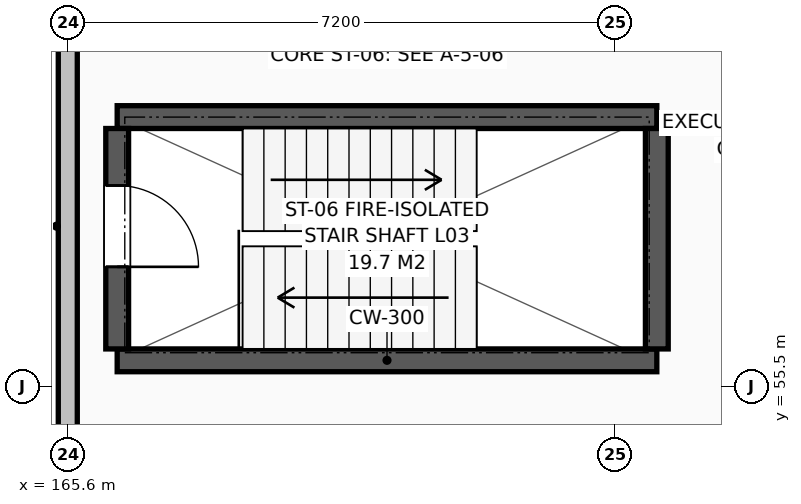
"""IFC4 building model, lengths in metres.
Left out: names, types, materials, properties, quantities, classifications, styles, units other than length and angle.
Written with IfcOpenShell. Run it as: python <this file> out.ifc"""

import sys

from ifc_helpers import new_model, si_unit, direction, frame, frame_2d, origin, place, context, subcontext, project, spatial, rectangle, extrude, element, fill, save


model = new_model("IFC4")
c1 = context("Model", 3, precision=1e-05, world=origin(), true_north=direction((0.0, 1.0)))
c2 = subcontext(c1, "Body", "Model", "MODEL_VIEW")
j1 = project(units=[si_unit("LENGTHUNIT", "METRE"), si_unit("PLANEANGLEUNIT", "RADIAN")], contexts=[c1])
p1 = place(None, origin())
s1 = spatial("IfcSite", under=j1, at=p1, CompositionType="ELEMENT")
p2 = place(p1, origin())
s2 = spatial("IfcBuilding", under=s1, at=p2, CompositionType="ELEMENT")
p3 = place(p2, frame((0.0, 0.0, 13.2)))
s3 = spatial("IfcBuildingStorey", under=s2, at=p3, CompositionType="ELEMENT", Elevation=13.2)
p4 = place(p3, frame((165.6, 64.8, 0.0), z_axis=(0.0, 0.0, 1.0), x_axis=(0.0, -1.0, 0.0)))
e1 = element("IfcWall", 1, at=p4, inside=s3, PredefinedType="SOLIDWALL", context=c2, shape_type="SweptSolid", body=[
    extrude(rectangle(XDim=32.4, YDim=0.25, at=frame_2d((16.2, 0.0))), origin(), (0.0, 0.0, 1.0), 3.35),
])
p5 = place(p4, frame((2.2, 0.0, 0.78)))
e2 = element("IfcOpeningElement", 2, at=p5, cuts=e1, PredefinedType="OPENING", context=c2, shape_type="SweptSolid", body=[
    extrude(rectangle(XDim=1.95, YDim=1.8, at=frame_2d((0.975, 0.9))), frame((0.0, 0.135, 0.0), z_axis=(0.0, -1.0, 0.0), x_axis=(1.0, 0.0, 0.0)), (0.0, 0.0, 1.0), 0.27),
])
p6 = place(p4, frame((16.6, 0.0, 0.78)))
e3 = element("IfcOpeningElement", 3, at=p6, cuts=e1, PredefinedType="OPENING", context=c2, shape_type="SweptSolid", body=[
    extrude(rectangle(XDim=1.1, YDim=1.65, at=frame_2d((0.55, 0.825))), frame((0.0, 0.135, 0.0), z_axis=(0.0, -1.0, 0.0), x_axis=(1.0, 0.0, 0.0)), (0.0, 0.0, 1.0), 0.27),
])
for number, where, z_axis, x_axis in (
    (4, (166.25, 55.85, 0.0), (0.0, 0.0, 1.0), (1.0, 0.0, 0.0)),
    (5, (173.35, 59.05, 0.0), (0.0, 0.0, 1.0), (-1.0, 0.0, 0.0)),
):
    element("IfcWall", number, at=place(p3, frame(where, z_axis=z_axis, x_axis=x_axis)), inside=s3, PredefinedType="SHEAR", context=c2, shape_type="SweptSolid", body=[
        extrude(rectangle(XDim=7.1, YDim=0.3, at=frame_2d((3.55, 0.0))), origin(), (0.0, 0.0, 1.0), 3.45),
    ])
p7 = place(p3, frame((173.35, 56.0, 0.0), z_axis=(0.0, 0.0, 1.0), x_axis=(0.0, 1.0, 0.0)))
e6 = element("IfcWall", 6, at=p7, inside=s3, PredefinedType="SHEAR", context=c2, shape_type="SweptSolid", body=[
    extrude(rectangle(XDim=2.9, YDim=0.3, at=frame_2d((1.45, 0.0))), origin(), (0.0, 0.0, 1.0), 3.45),
])
p8 = place(p3, frame((166.25, 58.9, 0.0), z_axis=(0.0, 0.0, 1.0), x_axis=(0.0, -1.0, 0.0)))
e7 = element("IfcWall", 7, at=p8, inside=s3, PredefinedType="SHEAR", context=c2, shape_type="SweptSolid", body=[
    extrude(rectangle(XDim=2.9, YDim=0.3, at=frame_2d((1.45, 0.0))), origin(), (0.0, 0.0, 1.0), 3.45),
])
p9 = place(p8, frame((0.75, 0.0, 0.0)))
e8 = element("IfcOpeningElement", 8, at=p9, cuts=e7, PredefinedType="OPENING", context=c2, shape_type="SweptSolid", body=[
    extrude(rectangle(XDim=1.07, YDim=2.15, at=frame_2d((0.535, 1.075))), frame((0.0, 0.16, 0.0), z_axis=(0.0, -1.0, 0.0), x_axis=(1.0, 0.0, 0.0)), (0.0, 0.0, 1.0), 0.32),
])
p10 = place(p9, origin())
e9 = element("IfcDoor", 9, at=p10, inside=s3, OperationType="SINGLE_SWING_RIGHT", PredefinedType="DOOR", context=c2, shape_type="SweptSolid", body=[
    extrude(rectangle(XDim=1.07, YDim=2.15, at=frame_2d((0.535, 1.075))), frame((0.0, 0.025, 0.0), z_axis=(0.0, -1.0, 0.0), x_axis=(1.0, 0.0, 0.0)), (0.0, 0.0, 1.0), 0.05),
])
fill(e8, e9)
save(model, sys.argv[1])
